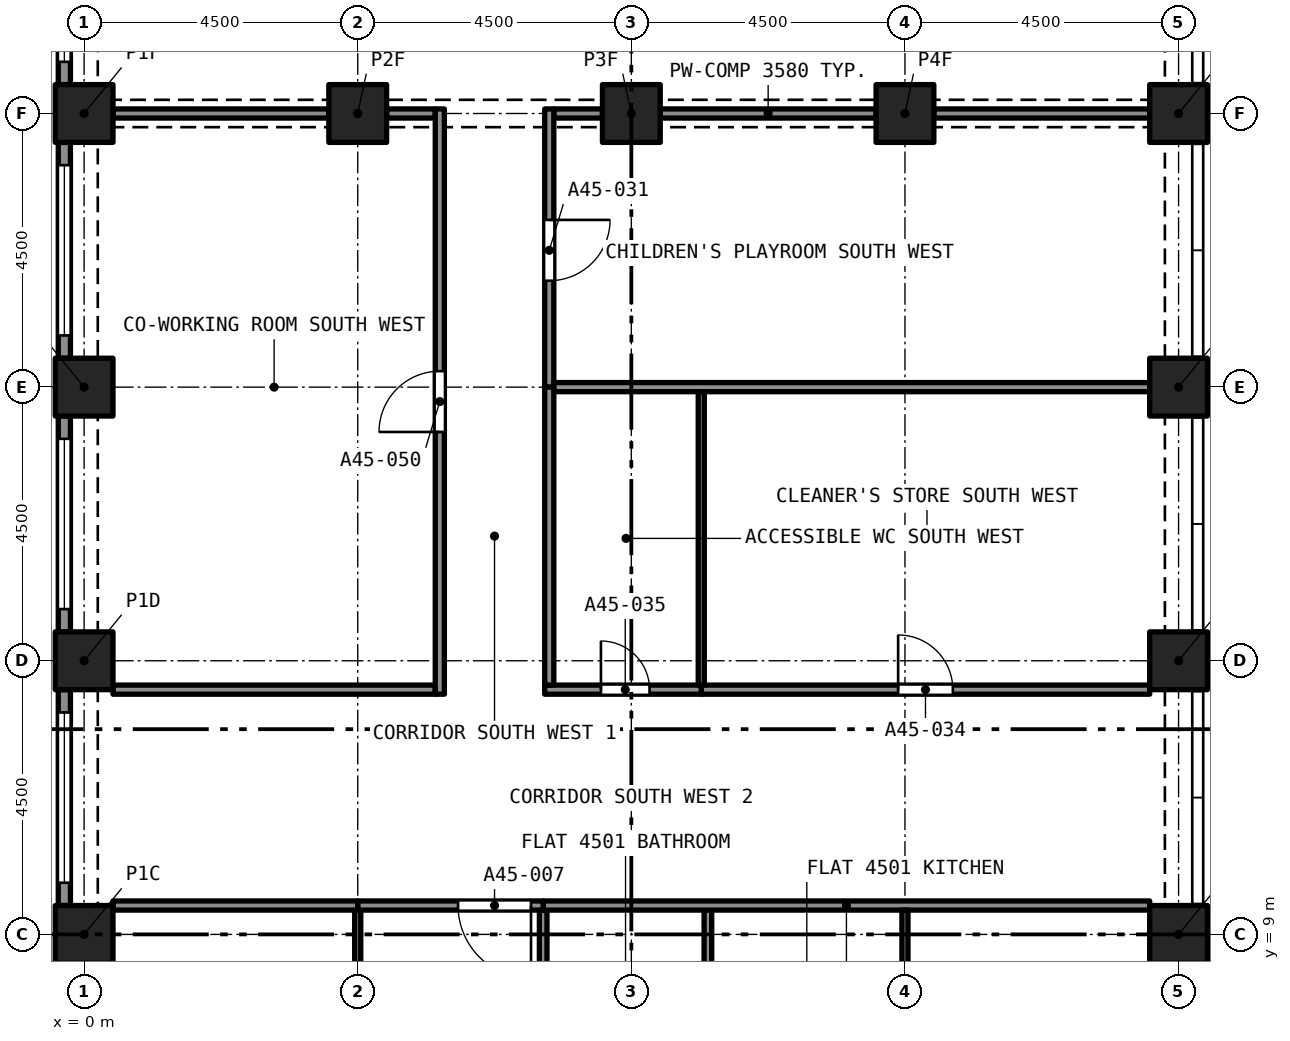
"""IFC4 building model, lengths in metres.
Left out: names, types, materials, properties, quantities, classifications, styles, units other than length and angle.
Written with IfcOpenShell. Run it as: python <this file> out.ifc"""

import sys

from ifc_helpers import new_model, si_unit, direction, frame, frame_2d, origin, origin_2d, place, context, subcontext, project, spatial, rectangle, extrude, element, fill, save


model = new_model("IFC4")
c1 = context("Model", 3, precision=1e-05, world=origin(), true_north=direction((0.0, 1.0)))
c2 = subcontext(c1, "Body", "Model", "MODEL_VIEW")
j1 = project(units=[si_unit("LENGTHUNIT", "METRE"), si_unit("PLANEANGLEUNIT", "RADIAN")], contexts=[c1])
p1 = place(None, origin())
s1 = spatial("IfcSite", under=j1, at=p1, CompositionType="ELEMENT")
p2 = place(p1, origin())
s2 = spatial("IfcBuilding", under=s1, at=p2, CompositionType="ELEMENT")
p3 = place(p2, frame((0.0, 0.0, 163.8)))
s3 = spatial("IfcBuildingStorey", under=s2, at=p3, CompositionType="ELEMENT", Elevation=163.8)
for number, where, z_axis, x_axis in (
    (1, (0.0, 9.0, 0.0), (0.0, 0.0, 1.0), (1.0, 0.0, 0.0)),
    (2, (18.0, 9.0, 0.0), (0.0, 0.0, 1.0), (1.0, 0.0, 0.0)),
    (3, (0.0, 13.5, 0.0), (0.0, 0.0, 1.0), (1.0, 0.0, 0.0)),
    (4, (18.0, 13.5, 0.0), (0.0, 0.0, 1.0), (1.0, 0.0, 0.0)),
    (5, (0.0, 18.0, 0.0), (0.0, 0.0, 1.0), (1.0, 0.0, 0.0)),
    (6, (18.0, 18.0, 0.0), (0.0, 0.0, 1.0), (1.0, 0.0, 0.0)),
    (7, (0.0, 22.5, 0.0), (0.0, 0.0, 1.0), (1.0, 0.0, 0.0)),
    (8, (4.5, 22.5, 0.0), (0.0, 0.0, 1.0), (1.0, 0.0, 0.0)),
    (9, (9.0, 22.5, 0.0), (0.0, 0.0, 1.0), (1.0, 0.0, 0.0)),
    (10, (13.5, 22.5, 0.0), (0.0, 0.0, 1.0), (1.0, 0.0, 0.0)),
    (11, (18.0, 22.5, 0.0), (0.0, 0.0, 1.0), (1.0, 0.0, 0.0)),
):
    element("IfcColumn", number, at=place(p3, frame(where, z_axis=z_axis, x_axis=x_axis)), inside=s3, PredefinedType="COLUMN", context=c2, shape_type="SweptSolid", body=[
        extrude(rectangle(XDim=0.95, YDim=0.95, at=origin_2d()), origin(), (0.0, 0.0, 1.0), 4.4),
    ])
p4 = place(p3, frame((-0.325, 22.975, 0.0), z_axis=(0.0, 0.0, 1.0), x_axis=(0.0, 1.0, 0.0)))
e12 = element("IfcWall", 12, at=p4, inside=s3, PredefinedType="SOLIDWALL", context=c2, shape_type="SweptSolid", body=[
    extrude(rectangle(XDim=3.55, YDim=0.2, at=frame_2d((1.775, 0.0))), origin(), (0.0, 0.0, 1.0), 4.4),
])
p5 = place(p4, frame((0.375, 0.0, 0.45)))
e13 = element("IfcOpeningElement", 13, at=p5, cuts=e12, PredefinedType="OPENING", context=c2, shape_type="SweptSolid", body=[
    extrude(rectangle(XDim=2.8, YDim=2.55, at=frame_2d((1.4, 1.275))), frame((0.0, 0.11, 0.0), z_axis=(0.0, -1.0, 0.0), x_axis=(1.0, 0.0, 0.0)), (0.0, 0.0, 1.0), 0.22),
])
p6 = place(p3, frame((-0.325, 18.475, 0.0), z_axis=(0.0, 0.0, 1.0), x_axis=(0.0, 1.0, 0.0)))
e14 = element("IfcWall", 14, at=p6, inside=s3, PredefinedType="SOLIDWALL", context=c2, shape_type="SweptSolid", body=[
    extrude(rectangle(XDim=3.55, YDim=0.2, at=frame_2d((1.775, 0.0))), origin(), (0.0, 0.0, 1.0), 4.4),
])
p7 = place(p6, frame((0.375, 0.0, 0.45)))
e15 = element("IfcOpeningElement", 15, at=p7, cuts=e14, PredefinedType="OPENING", context=c2, shape_type="SweptSolid", body=[
    extrude(rectangle(XDim=2.8, YDim=2.55, at=frame_2d((1.4, 1.275))), frame((0.0, 0.11, 0.0), z_axis=(0.0, -1.0, 0.0), x_axis=(1.0, 0.0, 0.0)), (0.0, 0.0, 1.0), 0.22),
])
p8 = place(p3, frame((-0.325, 13.975, 0.0), z_axis=(0.0, 0.0, 1.0), x_axis=(0.0, 1.0, 0.0)))
e16 = element("IfcWall", 16, at=p8, inside=s3, PredefinedType="SOLIDWALL", context=c2, shape_type="SweptSolid", body=[
    extrude(rectangle(XDim=3.55, YDim=0.2, at=frame_2d((1.775, 0.0))), origin(), (0.0, 0.0, 1.0), 4.4),
])
p9 = place(p8, frame((0.375, 0.0, 0.45)))
e17 = element("IfcOpeningElement", 17, at=p9, cuts=e16, PredefinedType="OPENING", context=c2, shape_type="SweptSolid", body=[
    extrude(rectangle(XDim=2.8, YDim=2.55, at=frame_2d((1.4, 1.275))), frame((0.0, 0.11, 0.0), z_axis=(0.0, -1.0, 0.0), x_axis=(1.0, 0.0, 0.0)), (0.0, 0.0, 1.0), 0.22),
])
p10 = place(p3, frame((-0.325, 9.475, 0.0), z_axis=(0.0, 0.0, 1.0), x_axis=(0.0, 1.0, 0.0)))
e18 = element("IfcWall", 18, at=p10, inside=s3, PredefinedType="SOLIDWALL", context=c2, shape_type="SweptSolid", body=[
    extrude(rectangle(XDim=3.55, YDim=0.2, at=frame_2d((1.775, 0.0))), origin(), (0.0, 0.0, 1.0), 4.4),
])
p11 = place(p10, frame((0.375, 0.0, 0.45)))
e19 = element("IfcOpeningElement", 19, at=p11, cuts=e18, PredefinedType="OPENING", context=c2, shape_type="SweptSolid", body=[
    extrude(rectangle(XDim=2.8, YDim=2.55, at=frame_2d((1.4, 1.275))), frame((0.0, 0.11, 0.0), z_axis=(0.0, -1.0, 0.0), x_axis=(1.0, 0.0, 0.0)), (0.0, 0.0, 1.0), 0.22),
])
for number, where, z_axis, x_axis in (
    (20, (7.55, 5.117, 0.0), (0.0, 0.0, 1.0), (0.0, 1.0, 0.0)),
    (21, (10.259, 5.117, 0.0), (0.0, 0.0, 1.0), (0.0, 1.0, 0.0)),
):
    element("IfcWall", number, at=place(p3, frame(where, z_axis=z_axis, x_axis=x_axis)), inside=s3, PredefinedType="PARTITIONING", context=c2, shape_type="SweptSolid", body=[
        extrude(rectangle(XDim=4.282, YDim=0.125, at=frame_2d((2.141, 0.0))), origin(), (0.0, 0.0, 1.0), 4.1),
    ])
p12 = place(p3, frame((7.55, 9.475, 0.0), z_axis=(0.0, 0.0, 1.0), x_axis=(1.0, 0.0, 0.0)))
e22 = element("IfcWall", 22, at=p12, inside=s3, PredefinedType="PARTITIONING", context=c2, shape_type="SweptSolid", body=[
    extrude(rectangle(XDim=9.975, YDim=0.15, at=frame_2d((4.987, 0.0))), origin(), (0.0, 0.0, 1.0), 4.1),
])
p13 = place(p3, frame((13.5, 5.055, 0.0), z_axis=(0.0, 0.0, 1.0), x_axis=(0.0, 1.0, 0.0)))
e23 = element("IfcWall", 23, at=p13, inside=s3, PredefinedType="PARTITIONING", context=c2, shape_type="SweptSolid", body=[
    extrude(rectangle(XDim=4.345, YDim=0.1, at=frame_2d((2.172, 0.0))), origin(), (0.0, 0.0, 1.0), 4.1),
])
p14 = place(p3, frame((4.5, 3.715, 0.0), z_axis=(0.0, 0.0, 1.0), x_axis=(0.0, 1.0, 0.0)))
e24 = element("IfcWall", 24, at=p14, inside=s3, PredefinedType="PARTITIONING", context=c2, shape_type="SweptSolid", body=[
    extrude(rectangle(XDim=5.685, YDim=0.1, at=frame_2d((2.842, 0.0))), origin(), (0.0, 0.0, 1.0), 4.1),
])
p15 = place(p14, frame((0.17, 0.0, 0.0)))
e25 = element("IfcOpeningElement", 25, at=p15, cuts=e24, PredefinedType="OPENING", context=c2, shape_type="SweptSolid", body=[
    extrude(rectangle(XDim=1.0, YDim=2.1, at=frame_2d((0.5, 1.05))), frame((0.0, 0.06, 0.0), z_axis=(0.0, -1.0, 0.0), x_axis=(1.0, 0.0, 0.0)), (0.0, 0.0, 1.0), 0.12),
])
p16 = place(p3, frame((7.55, 9.475, 0.0), z_axis=(0.0, 0.0, 1.0), x_axis=(-1.0, 0.0, 0.0)))
e26 = element("IfcWall", 26, at=p16, inside=s3, PredefinedType="PARTITIONING", context=c2, shape_type="SweptSolid", body=[
    extrude(rectangle(XDim=3.05, YDim=0.15, at=frame_2d((1.525, 0.0))), origin(), (0.0, 0.0, 1.0), 4.1),
])
p17 = place(p16, frame((0.2, 0.0, 0.0)))
e27 = element("IfcOpeningElement", 27, at=p17, cuts=e26, PredefinedType="OPENING", context=c2, shape_type="SweptSolid", body=[
    extrude(rectangle(XDim=1.2, YDim=2.4, at=frame_2d((0.6, 1.2))), frame((0.0, 0.085, 0.0), z_axis=(0.0, -1.0, 0.0), x_axis=(1.0, 0.0, 0.0)), (0.0, 0.0, 1.0), 0.17),
])
p18 = place(p3, frame((0.475, 9.475, 0.0), z_axis=(0.0, 0.0, 1.0), x_axis=(1.0, 0.0, 0.0)))
e28 = element("IfcWall", 28, at=p18, inside=s3, PredefinedType="PARTITIONING", context=c2, shape_type="SweptSolid", body=[
    extrude(rectangle(XDim=4.025, YDim=0.15, at=frame_2d((2.012, 0.0))), origin(), (0.0, 0.0, 1.0), 4.1),
])
p19 = place(p3, frame((7.725, 22.5, 0.0), z_axis=(0.0, 0.0, 1.0), x_axis=(1.0, 0.0, 0.0)))
e29 = element("IfcWall", 29, at=p19, inside=s3, PredefinedType="PARTITIONING", context=c2, shape_type="SweptSolid", body=[
    extrude(rectangle(XDim=0.8, YDim=0.15, at=frame_2d((0.4, 0.0))), origin(), (0.0, 0.0, 1.0), 3.58),
])
for number, where, z_axis, x_axis in (
    (30, (9.475, 22.5, 0.0), (0.0, 0.0, 1.0), (1.0, 0.0, 0.0)),
    (31, (13.975, 22.5, 0.0), (0.0, 0.0, 1.0), (1.0, 0.0, 0.0)),
):
    element("IfcWall", number, at=place(p3, frame(where, z_axis=z_axis, x_axis=x_axis)), inside=s3, PredefinedType="PARTITIONING", context=c2, shape_type="SweptSolid", body=[
        extrude(rectangle(XDim=3.55, YDim=0.15, at=frame_2d((1.775, 0.0))), origin(), (0.0, 0.0, 1.0), 3.58),
    ])
p20 = place(p3, frame((7.65, 22.575, 0.0), z_axis=(0.0, 0.0, 1.0), x_axis=(0.0, -1.0, 0.0)))
e32 = element("IfcWall", 32, at=p20, inside=s3, PredefinedType="PARTITIONING", context=c2, shape_type="SweptSolid", body=[
    extrude(rectangle(XDim=4.575, YDim=0.15, at=frame_2d((2.288, 0.0))), origin(), (0.0, 0.0, 1.0), 4.1),
])
p21 = place(p20, frame((1.825, 0.0, 0.0)))
e33 = element("IfcOpeningElement", 33, at=p21, cuts=e32, PredefinedType="OPENING", context=c2, shape_type="SweptSolid", body=[
    extrude(rectangle(XDim=1.0, YDim=2.1, at=frame_2d((0.5, 1.05))), frame((0.0, 0.085, 0.0), z_axis=(0.0, -1.0, 0.0), x_axis=(1.0, 0.0, 0.0)), (0.0, 0.0, 1.0), 0.17),
])
p22 = place(p3, frame((7.725, 18.0, 0.0), z_axis=(0.0, 0.0, 1.0), x_axis=(1.0, 0.0, 0.0)))
e34 = element("IfcWall", 34, at=p22, inside=s3, PredefinedType="PARTITIONING", context=c2, shape_type="SweptSolid", body=[
    extrude(rectangle(XDim=9.8, YDim=0.15, at=frame_2d((4.9, 0.0))), origin(), (0.0, 0.0, 1.0), 4.1),
])
p23 = place(p3, frame((10.15, 13.025, 0.0), z_axis=(0.0, 0.0, 1.0), x_axis=(1.0, 0.0, 0.0)))
e35 = element("IfcWall", 35, at=p23, inside=s3, PredefinedType="PARTITIONING", context=c2, shape_type="SweptSolid", body=[
    extrude(rectangle(XDim=7.375, YDim=0.15, at=frame_2d((3.688, 0.0))), origin(), (0.0, 0.0, 1.0), 4.1),
])
p24 = place(p23, frame((3.238, 0.0, 0.0)))
e36 = element("IfcOpeningElement", 36, at=p24, cuts=e35, PredefinedType="OPENING", context=c2, shape_type="SweptSolid", body=[
    extrude(rectangle(XDim=0.9, YDim=2.1, at=frame_2d((0.45, 1.05))), frame((0.0, 0.085, 0.0), z_axis=(0.0, -1.0, 0.0), x_axis=(1.0, 0.0, 0.0)), (0.0, 0.0, 1.0), 0.17),
])
p25 = place(p3, frame((7.575, 13.025, 0.0), z_axis=(0.0, 0.0, 1.0), x_axis=(1.0, 0.0, 0.0)))
e37 = element("IfcWall", 37, at=p25, inside=s3, PredefinedType="PARTITIONING", context=c2, shape_type="SweptSolid", body=[
    extrude(rectangle(XDim=2.575, YDim=0.15, at=frame_2d((1.288, 0.0))), origin(), (0.0, 0.0, 1.0), 4.1),
])
p26 = place(p25, frame((0.925, 0.0, 0.0)))
e38 = element("IfcOpeningElement", 38, at=p26, cuts=e37, PredefinedType="OPENING", context=c2, shape_type="SweptSolid", body=[
    extrude(rectangle(XDim=0.8, YDim=2.1, at=frame_2d((0.4, 1.05))), frame((0.0, 0.085, 0.0), z_axis=(0.0, -1.0, 0.0), x_axis=(1.0, 0.0, 0.0)), (0.0, 0.0, 1.0), 0.17),
])
p27 = place(p3, frame((0.475, 13.025, 0.0), z_axis=(0.0, 0.0, 1.0), x_axis=(1.0, 0.0, 0.0)))
e39 = element("IfcWall", 39, at=p27, inside=s3, PredefinedType="PARTITIONING", context=c2, shape_type="SweptSolid", body=[
    extrude(rectangle(XDim=5.3, YDim=0.15, at=frame_2d((2.65, 0.0))), origin(), (0.0, 0.0, 1.0), 4.1),
])
p28 = place(p3, frame((4.975, 22.5, 0.0), z_axis=(0.0, 0.0, 1.0), x_axis=(1.0, 0.0, 0.0)))
e40 = element("IfcWall", 40, at=p28, inside=s3, PredefinedType="PARTITIONING", context=c2, shape_type="SweptSolid", body=[
    extrude(rectangle(XDim=0.8, YDim=0.15, at=frame_2d((0.4, 0.0))), origin(), (0.0, 0.0, 1.0), 3.58),
])
p29 = place(p3, frame((0.475, 22.5, 0.0), z_axis=(0.0, 0.0, 1.0), x_axis=(1.0, 0.0, 0.0)))
e41 = element("IfcWall", 41, at=p29, inside=s3, PredefinedType="PARTITIONING", context=c2, shape_type="SweptSolid", body=[
    extrude(rectangle(XDim=3.55, YDim=0.15, at=frame_2d((1.775, 0.0))), origin(), (0.0, 0.0, 1.0), 3.58),
])
p30 = place(p3, frame((7.65, 13.1, 0.0), z_axis=(0.0, 0.0, 1.0), x_axis=(0.0, 1.0, 0.0)))
e42 = element("IfcWall", 42, at=p30, inside=s3, PredefinedType="PARTITIONING", context=c2, shape_type="SweptSolid", body=[
    extrude(rectangle(XDim=4.9, YDim=0.15, at=frame_2d((2.45, 0.0))), origin(), (0.0, 0.0, 1.0), 4.1),
])
p31 = place(p3, frame((5.85, 12.95, 0.0), z_axis=(0.0, 0.0, 1.0), x_axis=(0.0, 1.0, 0.0)))
e43 = element("IfcWall", 43, at=p31, inside=s3, PredefinedType="PARTITIONING", context=c2, shape_type="SweptSolid", body=[
    extrude(rectangle(XDim=9.625, YDim=0.15, at=frame_2d((4.812, 0.0))), origin(), (0.0, 0.0, 1.0), 4.1),
])
p32 = place(p31, frame((4.312, 0.0, 0.0)))
e44 = element("IfcOpeningElement", 44, at=p32, cuts=e43, PredefinedType="OPENING", context=c2, shape_type="SweptSolid", body=[
    extrude(rectangle(XDim=1.0, YDim=2.1, at=frame_2d((0.5, 1.05))), frame((0.0, 0.085, 0.0), z_axis=(0.0, -1.0, 0.0), x_axis=(1.0, 0.0, 0.0)), (0.0, 0.0, 1.0), 0.17),
])
p33 = place(p3, frame((10.15, 13.1, 0.0), z_axis=(0.0, 0.0, 1.0), x_axis=(0.0, 1.0, 0.0)))
e45 = element("IfcWall", 45, at=p33, inside=s3, PredefinedType="PARTITIONING", context=c2, shape_type="SweptSolid", body=[
    extrude(rectangle(XDim=4.825, YDim=0.1, at=frame_2d((2.413, 0.0))), origin(), (0.0, 0.0, 1.0), 4.1),
])
p34 = place(p5, origin())
e46 = element("IfcWindow", 46, at=p34, inside=s3, PartitioningType="SINGLE_PANEL", PredefinedType="WINDOW", context=c2, shape_type="SweptSolid", body=[
    extrude(rectangle(XDim=2.8, YDim=2.55, at=frame_2d((1.4, 1.275))), frame((0.0, 0.03, 0.0), z_axis=(0.0, -1.0, 0.0), x_axis=(1.0, 0.0, 0.0)), (0.0, 0.0, 1.0), 0.06),
])
fill(e13, e46)
p35 = place(p7, origin())
e47 = element("IfcWindow", 47, at=p35, inside=s3, PartitioningType="SINGLE_PANEL", PredefinedType="WINDOW", context=c2, shape_type="SweptSolid", body=[
    extrude(rectangle(XDim=2.8, YDim=2.55, at=frame_2d((1.4, 1.275))), frame((0.0, 0.03, 0.0), z_axis=(0.0, -1.0, 0.0), x_axis=(1.0, 0.0, 0.0)), (0.0, 0.0, 1.0), 0.06),
])
fill(e15, e47)
p36 = place(p9, origin())
e48 = element("IfcWindow", 48, at=p36, inside=s3, PartitioningType="SINGLE_PANEL", PredefinedType="WINDOW", context=c2, shape_type="SweptSolid", body=[
    extrude(rectangle(XDim=2.8, YDim=2.55, at=frame_2d((1.4, 1.275))), frame((0.0, 0.03, 0.0), z_axis=(0.0, -1.0, 0.0), x_axis=(1.0, 0.0, 0.0)), (0.0, 0.0, 1.0), 0.06),
])
fill(e17, e48)
p37 = place(p11, origin())
e49 = element("IfcWindow", 49, at=p37, inside=s3, PartitioningType="SINGLE_PANEL", PredefinedType="WINDOW", context=c2, shape_type="SweptSolid", body=[
    extrude(rectangle(XDim=2.8, YDim=2.55, at=frame_2d((1.4, 1.275))), frame((0.0, 0.03, 0.0), z_axis=(0.0, -1.0, 0.0), x_axis=(1.0, 0.0, 0.0)), (0.0, 0.0, 1.0), 0.06),
])
fill(e19, e49)
p38 = place(p17, origin())
e50 = element("IfcDoor", 50, at=p38, inside=s3, OperationType="SINGLE_SWING_LEFT", PredefinedType="DOOR", context=c2, shape_type="SweptSolid", body=[
    extrude(rectangle(XDim=1.2, YDim=2.4, at=frame_2d((0.6, 1.2))), frame((0.0, 0.025, 0.0), z_axis=(0.0, -1.0, 0.0), x_axis=(1.0, 0.0, 0.0)), (0.0, 0.0, 1.0), 0.05),
])
fill(e27, e50)
p39 = place(p21, origin())
e51 = element("IfcDoor", 51, at=p39, inside=s3, OperationType="SINGLE_SWING_RIGHT", PredefinedType="DOOR", context=c2, shape_type="SweptSolid", body=[
    extrude(rectangle(XDim=1.0, YDim=2.1, at=frame_2d((0.5, 1.05))), frame((0.0, 0.025, 0.0), z_axis=(0.0, -1.0, 0.0), x_axis=(1.0, 0.0, 0.0)), (0.0, 0.0, 1.0), 0.05),
])
fill(e33, e51)
p40 = place(p24, origin())
e52 = element("IfcDoor", 52, at=p40, inside=s3, OperationType="SINGLE_SWING_LEFT", PredefinedType="DOOR", context=c2, shape_type="SweptSolid", body=[
    extrude(rectangle(XDim=0.9, YDim=2.1, at=frame_2d((0.45, 1.05))), frame((0.0, 0.025, 0.0), z_axis=(0.0, -1.0, 0.0), x_axis=(1.0, 0.0, 0.0)), (0.0, 0.0, 1.0), 0.05),
])
fill(e36, e52)
p41 = place(p26, origin())
e53 = element("IfcDoor", 53, at=p41, inside=s3, OperationType="SINGLE_SWING_RIGHT", PredefinedType="DOOR", context=c2, shape_type="SweptSolid", body=[
    extrude(rectangle(XDim=0.8, YDim=2.1, at=frame_2d((0.4, 1.05))), frame((0.0, 0.025, 0.0), z_axis=(0.0, -1.0, 0.0), x_axis=(1.0, 0.0, 0.0)), (0.0, 0.0, 1.0), 0.05),
])
fill(e38, e53)
p42 = place(p32, origin())
e54 = element("IfcDoor", 54, at=p42, inside=s3, OperationType="SINGLE_SWING_RIGHT", PredefinedType="DOOR", context=c2, shape_type="SweptSolid", body=[
    extrude(rectangle(XDim=1.0, YDim=2.1, at=frame_2d((0.5, 1.05))), frame((0.0, 0.025, 0.0), z_axis=(0.0, -1.0, 0.0), x_axis=(1.0, 0.0, 0.0)), (0.0, 0.0, 1.0), 0.05),
])
fill(e44, e54)
save(model, sys.argv[1])
